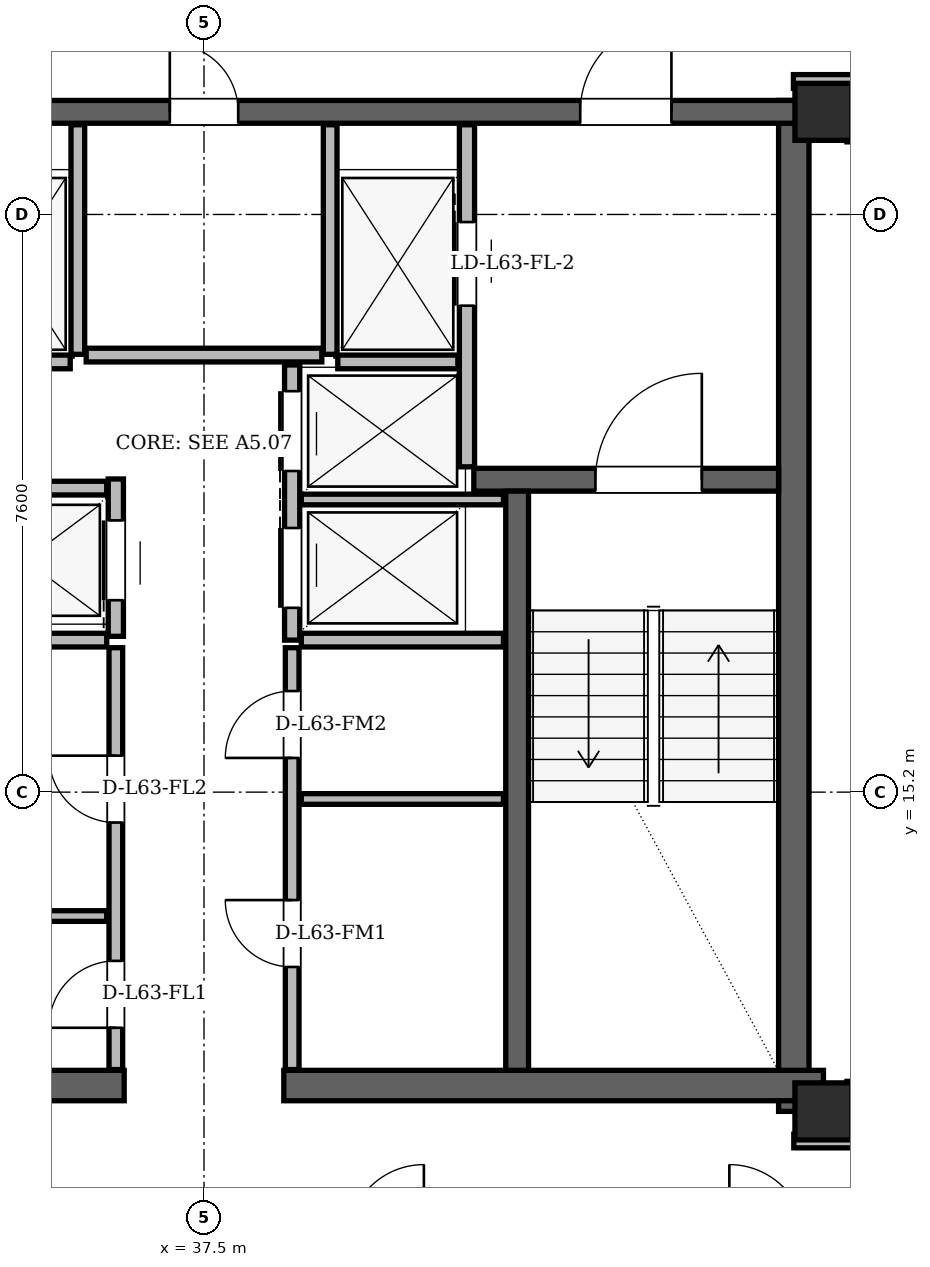
"""IFC4 building model, lengths in metres.
Left out: names, types, materials, properties, quantities, classifications, styles, units other than length and angle.
Written with IfcOpenShell. Run it as: python <this file> out.ifc"""

import sys

from ifc_helpers import new_model, si_unit, direction, frame, frame_2d, origin, origin_2d, place, context, subcontext, project, spatial, rectangle, hollow_rectangle, extrude, element, fill, save


model = new_model("IFC4")
c1 = context("Model", 3, precision=1e-05, world=origin(), true_north=direction((0.0, 1.0)))
c2 = subcontext(c1, "Body", "Model", "MODEL_VIEW")
j1 = project(units=[si_unit("LENGTHUNIT", "METRE"), si_unit("PLANEANGLEUNIT", "RADIAN")], contexts=[c1])
p1 = place(None, origin())
s1 = spatial("IfcSite", under=j1, at=p1, CompositionType="ELEMENT")
p2 = place(p1, origin())
s2 = spatial("IfcBuilding", under=s1, at=p2, CompositionType="ELEMENT")
p3 = place(p2, frame((0.0, 0.0, 237.9)))
s3 = spatial("IfcBuildingStorey", under=s2, at=p3, CompositionType="ELEMENT", Elevation=237.9)
for number, where, z_axis, x_axis in (
    (1, (45.65, 11.0, 0.0), (0.0, 0.0, 1.0), (1.0, 0.0, 0.0)),
    (2, (45.65, 24.15, 0.0), (0.0, 0.0, 1.0), (1.0, 0.0, 0.0)),
):
    element("IfcColumn", number, at=place(p3, frame(where, z_axis=z_axis, x_axis=x_axis)), inside=s3, PredefinedType="COLUMN", context=c2, shape_type="SweptSolid", body=[
        extrude(hollow_rectangle(XDim=0.75, YDim=0.75, WallThickness=0.06, at=origin_2d()), origin(), (0.0, 0.0, 1.0), 3.6),
    ])
p4 = place(p3, frame((45.26, 11.0, 0.0), z_axis=(0.0, 0.0, 1.0), x_axis=(0.0, 1.0, 0.0)))
e3 = element("IfcWall", 3, at=p4, inside=s3, PredefinedType="SHEAR", context=c2, shape_type="SweptSolid", body=[
    extrude(rectangle(XDim=13.3, YDim=0.4, at=frame_2d((6.65, 0.0))), origin(), (0.0, 0.0, 1.0), 3.38),
])
for number, where, z_axis, x_axis in (
    (4, (29.35, 11.34, 0.0), (0.0, 0.0, 1.0), (1.0, 0.0, 0.0)),
    (5, (38.55, 11.34, 0.0), (0.0, 0.0, 1.0), (1.0, 0.0, 0.0)),
):
    element("IfcWall", number, at=place(p3, frame(where, z_axis=z_axis, x_axis=x_axis)), inside=s3, PredefinedType="SHEAR", context=c2, shape_type="SweptSolid", body=[
        extrude(rectangle(XDim=7.1, YDim=0.4, at=frame_2d((3.55, 0.0))), origin(), (0.0, 0.0, 1.0), 3.38),
    ])
p5 = place(p3, frame((29.65, 24.15, 0.0), z_axis=(0.0, 0.0, 1.0), x_axis=(1.0, 0.0, 0.0)))
e6 = element("IfcWall", 6, at=p5, inside=s3, PredefinedType="SHEAR", context=c2, shape_type="SweptSolid", body=[
    extrude(rectangle(XDim=15.7, YDim=0.3, at=frame_2d((7.85, 0.0))), origin(), (0.0, 0.0, 1.0), 3.38),
])
p6 = place(p5, frame((1.7, 0.0, 0.0)))
e7 = element("IfcOpeningElement", 7, at=p6, cuts=e6, PredefinedType="OPENING", context=c2, shape_type="SweptSolid", body=[
    extrude(rectangle(XDim=1.2, YDim=2.2, at=frame_2d((0.6, 1.1))), frame((0.0, 0.15, 0.0), z_axis=(0.0, -1.0, 0.0), x_axis=(1.0, 0.0, 0.0)), (0.0, 0.0, 1.0), 0.3),
])
p7 = place(p5, frame((12.8, 0.0, 0.0)))
e8 = element("IfcOpeningElement", 8, at=p7, cuts=e6, PredefinedType="OPENING", context=c2, shape_type="SweptSolid", body=[
    extrude(rectangle(XDim=1.2, YDim=2.2, at=frame_2d((0.6, 1.1))), frame((0.0, 0.15, 0.0), z_axis=(0.0, -1.0, 0.0), x_axis=(1.0, 0.0, 0.0)), (0.0, 0.0, 1.0), 0.3),
])
p8 = place(p5, frame((7.4, 0.0, 0.0)))
e9 = element("IfcOpeningElement", 9, at=p8, cuts=e6, PredefinedType="OPENING", context=c2, shape_type="SweptSolid", body=[
    extrude(rectangle(XDim=0.9, YDim=2.05, at=frame_2d((0.45, 1.025))), frame((0.0, 0.15, 0.0), z_axis=(0.0, -1.0, 0.0), x_axis=(1.0, 0.0, 0.0)), (0.0, 0.0, 1.0), 0.3),
])
p9 = place(p3, frame((41.05, 19.31, 0.0), z_axis=(0.0, 0.0, 1.0), x_axis=(1.0, 0.0, 0.0)))
e10 = element("IfcWall", 10, at=p9, inside=s3, PredefinedType="SHEAR", context=c2, shape_type="SweptSolid", body=[
    extrude(rectangle(XDim=4.01, YDim=0.3, at=frame_2d((2.005, 0.0))), origin(), (0.0, 0.0, 1.0), 3.38),
])
p10 = place(p9, frame((1.6, 0.0, 0.0)))
e11 = element("IfcOpeningElement", 11, at=p10, cuts=e10, PredefinedType="OPENING", context=c2, shape_type="SweptSolid", body=[
    extrude(rectangle(XDim=1.4, YDim=2.2, at=frame_2d((0.7, 1.1))), frame((0.0, 0.15, 0.0), z_axis=(0.0, -1.0, 0.0), x_axis=(1.0, 0.0, 0.0)), (0.0, 0.0, 1.0), 0.3),
])
p11 = place(p3, frame((41.62, 11.54, 0.0), z_axis=(0.0, 0.0, 1.0), x_axis=(0.0, 1.0, 0.0)))
e12 = element("IfcWall", 12, at=p11, inside=s3, PredefinedType="SHEAR", context=c2, shape_type="SweptSolid", body=[
    extrude(rectangle(XDim=7.62, YDim=0.3, at=frame_2d((3.81, 0.0))), origin(), (0.0, 0.0, 1.0), 3.38),
])
p12 = place(p3, frame((58.899, 11.151, 0.0), z_axis=(0.0, 0.0, 1.0), x_axis=(-0.500002325133, 0.866024061364, 0.0)))
e13 = element("IfcWall", 13, at=p12, inside=s3, PredefinedType="SOLIDWALL", context=c2, shape_type="SweptSolid", body=[
    extrude(rectangle(XDim=36.9, YDim=0.29, at=frame_2d((18.45, 0.0))), origin(), (0.0, 0.0, 1.0), 2.677),
])
p13 = place(p12, frame((3.429, 0.0, 0.0)))
e14 = element("IfcOpeningElement", 14, at=p13, cuts=e13, PredefinedType="OPENING", context=c2, shape_type="SweptSolid", body=[
    extrude(rectangle(XDim=1.5, YDim=2.2, at=frame_2d((0.75, 1.1))), frame((0.0, 0.145, 0.0), z_axis=(0.0, -1.0, 0.0), x_axis=(1.0, 0.0, 0.0)), (0.0, 0.0, 1.0), 0.29),
])
p14 = place(p12, frame((27.156, 0.0, 0.0)))
e15 = element("IfcOpeningElement", 15, at=p14, cuts=e13, PredefinedType="OPENING", context=c2, shape_type="SweptSolid", body=[
    extrude(rectangle(XDim=1.5, YDim=2.2, at=frame_2d((0.75, 1.1))), frame((0.0, 0.145, 0.0), z_axis=(0.0, -1.0, 0.0), x_axis=(1.0, 0.0, 0.0)), (0.0, 0.0, 1.0), 0.29),
])
p15 = place(p12, frame((6.97, 0.0, 0.85)))
e16 = element("IfcOpeningElement", 16, at=p15, cuts=e13, PredefinedType="OPENING", context=c2, shape_type="SweptSolid", body=[
    extrude(rectangle(XDim=1.6, YDim=1.7, at=frame_2d((0.8, 0.85))), frame((0.0, 0.145, 0.0), z_axis=(0.0, -1.0, 0.0), x_axis=(1.0, 0.0, 0.0)), (0.0, 0.0, 1.0), 0.29),
])
p16 = place(p12, frame((1.106, 0.0, 0.85)))
e17 = element("IfcOpeningElement", 17, at=p16, cuts=e13, PredefinedType="OPENING", context=c2, shape_type="SweptSolid", body=[
    extrude(rectangle(XDim=1.6, YDim=1.7, at=frame_2d((0.8, 0.85))), frame((0.0, 0.145, 0.0), z_axis=(0.0, -1.0, 0.0), x_axis=(1.0, 0.0, 0.0)), (0.0, 0.0, 1.0), 0.29),
])
p17 = place(p12, frame((34.697, 0.0, 0.85)))
e18 = element("IfcOpeningElement", 18, at=p17, cuts=e13, PredefinedType="OPENING", context=c2, shape_type="SweptSolid", body=[
    extrude(rectangle(XDim=1.2, YDim=1.48, at=frame_2d((0.6, 0.74))), frame((0.0, 0.145, 0.0), z_axis=(0.0, -1.0, 0.0), x_axis=(1.0, 0.0, 0.0)), (0.0, 0.0, 1.0), 0.29),
])
p18 = place(p12, frame((16.774, 0.0, 0.85)))
e19 = element("IfcOpeningElement", 19, at=p18, cuts=e13, PredefinedType="OPENING", context=c2, shape_type="SweptSolid", body=[
    extrude(rectangle(XDim=2.2, YDim=1.717, at=frame_2d((1.1, 0.858))), frame((0.0, 0.145, 0.0), z_axis=(0.0, -1.0, 0.0), x_axis=(1.0, 0.0, 0.0)), (0.0, 0.0, 1.0), 0.29),
])
p19 = place(p12, frame((22.799, 0.0, 0.85)))
e20 = element("IfcOpeningElement", 20, at=p19, cuts=e13, PredefinedType="OPENING", context=c2, shape_type="SweptSolid", body=[
    extrude(rectangle(XDim=1.6, YDim=1.7, at=frame_2d((0.8, 0.85))), frame((0.0, 0.145, 0.0), z_axis=(0.0, -1.0, 0.0), x_axis=(1.0, 0.0, 0.0)), (0.0, 0.0, 1.0), 0.29),
])
p20 = place(p12, frame((29.059, 0.0, 0.85)))
e21 = element("IfcOpeningElement", 21, at=p20, cuts=e13, PredefinedType="OPENING", context=c2, shape_type="SweptSolid", body=[
    extrude(rectangle(XDim=1.2, YDim=1.48, at=frame_2d((0.6, 0.74))), frame((0.0, 0.145, 0.0), z_axis=(0.0, -1.0, 0.0), x_axis=(1.0, 0.0, 0.0)), (0.0, 0.0, 1.0), 0.29),
])
p21 = place(p12, frame((31.635, 0.0, 0.85)))
e22 = element("IfcOpeningElement", 22, at=p21, cuts=e13, PredefinedType="OPENING", context=c2, shape_type="SweptSolid", body=[
    extrude(rectangle(XDim=1.2, YDim=1.48, at=frame_2d((0.6, 0.74))), frame((0.0, 0.145, 0.0), z_axis=(0.0, -1.0, 0.0), x_axis=(1.0, 0.0, 0.0)), (0.0, 0.0, 1.0), 0.29),
])
p22 = place(p12, frame((12.419, 0.0, 0.85)))
e23 = element("IfcOpeningElement", 23, at=p22, cuts=e13, PredefinedType="OPENING", context=c2, shape_type="SweptSolid", body=[
    extrude(rectangle(XDim=1.2, YDim=1.48, at=frame_2d((0.6, 0.74))), frame((0.0, 0.145, 0.0), z_axis=(0.0, -1.0, 0.0), x_axis=(1.0, 0.0, 0.0)), (0.0, 0.0, 1.0), 0.29),
])
p23 = place(p3, frame((35.84, 20.96, 0.0), z_axis=(0.0, 0.0, 1.0), x_axis=(0.0, 1.0, 0.0)))
e24 = element("IfcWall", 24, at=p23, inside=s3, PredefinedType="PARTITIONING", context=c2, shape_type="SweptSolid", body=[
    extrude(rectangle(XDim=3.02, YDim=0.18, at=frame_2d((1.51, 0.0))), origin(), (0.0, 0.0, 1.0), 3.38),
])
p24 = place(p3, frame((34.16, 20.86, 0.0), z_axis=(0.0, 0.0, 1.0), x_axis=(1.0, 0.0, 0.0)))
e25 = element("IfcWall", 25, at=p24, inside=s3, PredefinedType="PARTITIONING", context=c2, shape_type="SweptSolid", body=[
    extrude(rectangle(XDim=1.58, YDim=0.18, at=frame_2d((0.79, 0.0))), origin(), (0.0, 0.0, 1.0), 3.38),
])
p25 = place(p3, frame((40.96, 19.48, 0.0), z_axis=(0.0, 0.0, 1.0), x_axis=(0.0, 1.0, 0.0)))
e26 = element("IfcWall", 26, at=p25, inside=s3, PredefinedType="PARTITIONING", context=c2, shape_type="SweptSolid", body=[
    extrude(rectangle(XDim=4.5, YDim=0.2, at=frame_2d((2.25, 0.0))), origin(), (0.0, 0.0, 1.0), 3.38),
])
p26 = place(p25, frame((2.12, 0.0, 0.0)))
e27 = element("IfcOpeningElement", 27, at=p26, cuts=e26, PredefinedType="OPENING", context=c2, shape_type="SweptSolid", body=[
    extrude(rectangle(XDim=1.1, YDim=2.2, at=frame_2d((0.55, 1.1))), frame((0.0, 0.1, 0.0), z_axis=(0.0, -1.0, 0.0), x_axis=(1.0, 0.0, 0.0)), (0.0, 0.0, 1.0), 0.2),
])
p27 = place(p3, frame((39.16, 20.96, 0.0), z_axis=(0.0, 0.0, 1.0), x_axis=(0.0, 1.0, 0.0)))
e28 = element("IfcWall", 28, at=p27, inside=s3, PredefinedType="PARTITIONING", context=c2, shape_type="SweptSolid", body=[
    extrude(rectangle(XDim=3.02, YDim=0.18, at=frame_2d((1.51, 0.0))), origin(), (0.0, 0.0, 1.0), 3.38),
])
p28 = place(p3, frame((39.26, 20.86, 0.0), z_axis=(0.0, 0.0, 1.0), x_axis=(1.0, 0.0, 0.0)))
e29 = element("IfcWall", 29, at=p28, inside=s3, PredefinedType="PARTITIONING", context=c2, shape_type="SweptSolid", body=[
    extrude(rectangle(XDim=1.58, YDim=0.18, at=frame_2d((0.79, 0.0))), origin(), (0.0, 0.0, 1.0), 3.38),
])
p29 = place(p3, frame((36.34, 17.25, 0.0), z_axis=(0.0, 0.0, 1.0), x_axis=(0.0, 1.0, 0.0)))
e30 = element("IfcWall", 30, at=p29, inside=s3, PredefinedType="PARTITIONING", context=c2, shape_type="SweptSolid", body=[
    extrude(rectangle(XDim=2.07, YDim=0.2, at=frame_2d((1.035, 0.0))), origin(), (0.0, 0.0, 1.0), 3.38),
])
p30 = place(p29, frame((0.475, 0.0, 0.0)))
e31 = element("IfcOpeningElement", 31, at=p30, cuts=e30, PredefinedType="OPENING", context=c2, shape_type="SweptSolid", body=[
    extrude(rectangle(XDim=1.05, YDim=2.15, at=frame_2d((0.525, 1.075))), frame((0.0, 0.1, 0.0), z_axis=(0.0, -1.0, 0.0), x_axis=(1.0, 0.0, 0.0)), (0.0, 0.0, 1.0), 0.2),
])
p31 = place(p3, frame((33.95, 19.2, 0.0), z_axis=(0.0, 0.0, 1.0), x_axis=(1.0, 0.0, 0.0)))
e32 = element("IfcWall", 32, at=p31, inside=s3, PredefinedType="PARTITIONING", context=c2, shape_type="SweptSolid", body=[
    extrude(rectangle(XDim=2.27, YDim=0.18, at=frame_2d((1.135, 0.0))), origin(), (0.0, 0.0, 1.0), 3.38),
])
p32 = place(p3, frame((33.56, 17.2, 0.0), z_axis=(0.0, 0.0, 1.0), x_axis=(1.0, 0.0, 0.0)))
e33 = element("IfcWall", 33, at=p32, inside=s3, PredefinedType="PARTITIONING", context=c2, shape_type="SweptSolid", body=[
    extrude(rectangle(XDim=2.66, YDim=0.18, at=frame_2d((1.33, 0.0))), origin(), (0.0, 0.0, 1.0), 3.38),
])
p33 = place(p3, frame((36.34, 11.55, 0.0), z_axis=(0.0, 0.0, 1.0), x_axis=(0.0, 1.0, 0.0)))
e34 = element("IfcWall", 34, at=p33, inside=s3, PredefinedType="PARTITIONING", context=c2, shape_type="SweptSolid", body=[
    extrude(rectangle(XDim=5.55, YDim=0.18, at=frame_2d((2.775, 0.0))), origin(), (0.0, 0.0, 1.0), 3.38),
])
p34 = place(p33, frame((0.55, 0.0, 0.0)))
e35 = element("IfcOpeningElement", 35, at=p34, cuts=e34, PredefinedType="OPENING", context=c2, shape_type="SweptSolid", body=[
    extrude(rectangle(XDim=0.88, YDim=2.08, at=frame_2d((0.44, 1.04))), frame((0.0, 0.09, 0.0), z_axis=(0.0, -1.0, 0.0), x_axis=(1.0, 0.0, 0.0)), (0.0, 0.0, 1.0), 0.18),
])
p35 = place(p33, frame((3.25, 0.0, 0.0)))
e36 = element("IfcOpeningElement", 36, at=p35, cuts=e34, PredefinedType="OPENING", context=c2, shape_type="SweptSolid", body=[
    extrude(rectangle(XDim=0.88, YDim=2.08, at=frame_2d((0.44, 1.04))), frame((0.0, 0.09, 0.0), z_axis=(0.0, -1.0, 0.0), x_axis=(1.0, 0.0, 0.0)), (0.0, 0.0, 1.0), 0.18),
])
p36 = place(p3, frame((33.56, 13.57, 0.0), z_axis=(0.0, 0.0, 1.0), x_axis=(1.0, 0.0, 0.0)))
e37 = element("IfcWall", 37, at=p36, inside=s3, PredefinedType="PARTITIONING", context=c2, shape_type="SweptSolid", body=[
    extrude(rectangle(XDim=2.66, YDim=0.14, at=frame_2d((1.33, 0.0))), origin(), (0.0, 0.0, 1.0), 3.38),
])
p37 = place(p3, frame((38.66, 17.2, 0.0), z_axis=(0.0, 0.0, 1.0), x_axis=(0.0, 1.0, 0.0)))
e38 = element("IfcWall", 38, at=p37, inside=s3, PredefinedType="PARTITIONING", context=c2, shape_type="SweptSolid", body=[
    extrude(rectangle(XDim=3.62, YDim=0.2, at=frame_2d((1.81, 0.0))), origin(), (0.0, 0.0, 1.0), 3.38),
])
p38 = place(p37, frame((0.425, 0.0, 0.0)))
e39 = element("IfcOpeningElement", 39, at=p38, cuts=e38, PredefinedType="OPENING", context=c2, shape_type="SweptSolid", body=[
    extrude(rectangle(XDim=1.05, YDim=2.15, at=frame_2d((0.525, 1.075))), frame((0.0, 0.1, 0.0), z_axis=(0.0, -1.0, 0.0), x_axis=(1.0, 0.0, 0.0)), (0.0, 0.0, 1.0), 0.2),
])
p39 = place(p37, frame((2.225, 0.0, 0.0)))
e40 = element("IfcOpeningElement", 40, at=p39, cuts=e38, PredefinedType="OPENING", context=c2, shape_type="SweptSolid", body=[
    extrude(rectangle(XDim=1.05, YDim=2.15, at=frame_2d((0.525, 1.075))), frame((0.0, 0.1, 0.0), z_axis=(0.0, -1.0, 0.0), x_axis=(1.0, 0.0, 0.0)), (0.0, 0.0, 1.0), 0.2),
])
p40 = place(p3, frame((38.78, 17.2, 0.0), z_axis=(0.0, 0.0, 1.0), x_axis=(1.0, 0.0, 0.0)))
e41 = element("IfcWall", 41, at=p40, inside=s3, PredefinedType="PARTITIONING", context=c2, shape_type="SweptSolid", body=[
    extrude(rectangle(XDim=2.66, YDim=0.18, at=frame_2d((1.33, 0.0))), origin(), (0.0, 0.0, 1.0), 3.38),
])
p41 = place(p3, frame((38.78, 19.05, 0.0), z_axis=(0.0, 0.0, 1.0), x_axis=(1.0, 0.0, 0.0)))
e42 = element("IfcWall", 42, at=p41, inside=s3, PredefinedType="PARTITIONING", context=c2, shape_type="SweptSolid", body=[
    extrude(rectangle(XDim=2.66, YDim=0.14, at=frame_2d((1.33, 0.0))), origin(), (0.0, 0.0, 1.0), 3.38),
])
p42 = place(p3, frame((38.66, 11.55, 0.0), z_axis=(0.0, 0.0, 1.0), x_axis=(0.0, 1.0, 0.0)))
e43 = element("IfcWall", 43, at=p42, inside=s3, PredefinedType="PARTITIONING", context=c2, shape_type="SweptSolid", body=[
    extrude(rectangle(XDim=5.55, YDim=0.18, at=frame_2d((2.775, 0.0))), origin(), (0.0, 0.0, 1.0), 3.38),
])
p43 = place(p42, frame((1.35, 0.0, 0.0)))
e44 = element("IfcOpeningElement", 44, at=p43, cuts=e43, PredefinedType="OPENING", context=c2, shape_type="SweptSolid", body=[
    extrude(rectangle(XDim=0.88, YDim=2.08, at=frame_2d((0.44, 1.04))), frame((0.0, 0.09, 0.0), z_axis=(0.0, -1.0, 0.0), x_axis=(1.0, 0.0, 0.0)), (0.0, 0.0, 1.0), 0.18),
])
p44 = place(p42, frame((4.1, 0.0, 0.0)))
e45 = element("IfcOpeningElement", 45, at=p44, cuts=e43, PredefinedType="OPENING", context=c2, shape_type="SweptSolid", body=[
    extrude(rectangle(XDim=0.88, YDim=2.08, at=frame_2d((0.44, 1.04))), frame((0.0, 0.09, 0.0), z_axis=(0.0, -1.0, 0.0), x_axis=(1.0, 0.0, 0.0)), (0.0, 0.0, 1.0), 0.18),
])
p45 = place(p3, frame((38.78, 15.11, 0.0), z_axis=(0.0, 0.0, 1.0), x_axis=(1.0, 0.0, 0.0)))
e46 = element("IfcWall", 46, at=p45, inside=s3, PredefinedType="PARTITIONING", context=c2, shape_type="SweptSolid", body=[
    extrude(rectangle(XDim=2.66, YDim=0.14, at=frame_2d((1.33, 0.0))), origin(), (0.0, 0.0, 1.0), 3.38),
])
p46 = place(p3, frame((35.95, 20.95, 0.0), z_axis=(0.0, 0.0, 1.0), x_axis=(1.0, 0.0, 0.0)))
e47 = element("IfcWall", 47, at=p46, inside=s3, PredefinedType="PARTITIONING", context=c2, shape_type="SweptSolid", body=[
    extrude(rectangle(XDim=3.1, YDim=0.18, at=frame_2d((1.55, 0.0))), origin(), (0.0, 0.0, 1.0), 3.38),
])
p47 = place(p3, frame((45.26, 10.61, 0.0), z_axis=(0.0, 0.0, 1.0), x_axis=(1.0, 0.0, 0.0)))
e48 = element("IfcWall", 48, at=p47, inside=s3, PredefinedType="PARTITIONING", context=c2, shape_type="SweptSolid", body=[
    extrude(rectangle(XDim=0.78, YDim=0.18, at=frame_2d((0.39, 0.0))), origin(), (0.0, 0.0, 1.0), 3.38),
])
p48 = place(p3, frame((45.255, 24.55, 0.0), z_axis=(0.0, 0.0, 1.0), x_axis=(1.0, 0.0, 0.0)))
e49 = element("IfcWall", 49, at=p48, inside=s3, PredefinedType="PARTITIONING", context=c2, shape_type="SweptSolid", body=[
    extrude(rectangle(XDim=0.79, YDim=0.18, at=frame_2d((0.395, 0.0))), origin(), (0.0, 0.0, 1.0), 2.913),
])
p49 = place(p3, frame((46.05, 10.95, 0.0), z_axis=(0.0, 0.0, 1.0), x_axis=(0.0, 1.0, 0.0)))
e50 = element("IfcWall", 50, at=p49, inside=s3, PredefinedType="PARTITIONING", context=c2, shape_type="SweptSolid", body=[
    extrude(rectangle(XDim=0.445, YDim=0.18, at=frame_2d((0.223, 0.0))), origin(), (0.0, 0.0, 1.0), 2.913),
])
p50 = place(p3, frame((46.05, 23.755, 0.0), z_axis=(0.0, 0.0, 1.0), x_axis=(0.0, 1.0, 0.0)))
e51 = element("IfcWall", 51, at=p50, inside=s3, PredefinedType="PARTITIONING", context=c2, shape_type="SweptSolid", body=[
    extrude(rectangle(XDim=0.565, YDim=0.18, at=frame_2d((0.283, 0.0))), origin(), (0.0, 0.0, 1.0), 3.38),
])
p51 = place(p34, origin())
e52 = element("IfcDoor", 52, at=p51, inside=s3, OperationType="SINGLE_SWING_LEFT", PredefinedType="DOOR", context=c2, shape_type="SweptSolid", body=[
    extrude(rectangle(XDim=0.88, YDim=2.08, at=frame_2d((0.44, 1.04))), frame((0.0, 0.025, 0.0), z_axis=(0.0, -1.0, 0.0), x_axis=(1.0, 0.0, 0.0)), (0.0, 0.0, 1.0), 0.05),
])
fill(e35, e52)
p52 = place(p35, origin())
e53 = element("IfcDoor", 53, at=p52, inside=s3, OperationType="SINGLE_SWING_RIGHT", PredefinedType="DOOR", context=c2, shape_type="SweptSolid", body=[
    extrude(rectangle(XDim=0.88, YDim=2.08, at=frame_2d((0.44, 1.04))), frame((0.0, 0.025, 0.0), z_axis=(0.0, -1.0, 0.0), x_axis=(1.0, 0.0, 0.0)), (0.0, 0.0, 1.0), 0.05),
])
fill(e36, e53)
p53 = place(p43, origin())
e54 = element("IfcDoor", 54, at=p53, inside=s3, OperationType="SINGLE_SWING_RIGHT", PredefinedType="DOOR", context=c2, shape_type="SweptSolid", body=[
    extrude(rectangle(XDim=0.88, YDim=2.08, at=frame_2d((0.44, 1.04))), frame((0.0, 0.025, 0.0), z_axis=(0.0, -1.0, 0.0), x_axis=(1.0, 0.0, 0.0)), (0.0, 0.0, 1.0), 0.05),
])
fill(e44, e54)
p54 = place(p44, origin())
e55 = element("IfcDoor", 55, at=p54, inside=s3, OperationType="SINGLE_SWING_LEFT", PredefinedType="DOOR", context=c2, shape_type="SweptSolid", body=[
    extrude(rectangle(XDim=0.88, YDim=2.08, at=frame_2d((0.44, 1.04))), frame((0.0, 0.025, 0.0), z_axis=(0.0, -1.0, 0.0), x_axis=(1.0, 0.0, 0.0)), (0.0, 0.0, 1.0), 0.05),
])
fill(e45, e55)
p55 = place(p26, origin())
e56 = element("IfcDoor", 56, at=p55, inside=s3, OperationType="SLIDING_TO_RIGHT", PredefinedType="DOOR", context=c2, shape_type="SweptSolid", body=[
    extrude(rectangle(XDim=1.1, YDim=2.2, at=frame_2d((0.55, 1.1))), frame((0.0, 0.025, 0.0), z_axis=(0.0, -1.0, 0.0), x_axis=(1.0, 0.0, 0.0)), (0.0, 0.0, 1.0), 0.05),
])
fill(e27, e56)
p56 = place(p30, origin())
e57 = element("IfcDoor", 57, at=p56, inside=s3, OperationType="SLIDING_TO_LEFT", PredefinedType="DOOR", context=c2, shape_type="SweptSolid", body=[
    extrude(rectangle(XDim=1.05, YDim=2.15, at=frame_2d((0.525, 1.075))), frame((0.0, 0.025, 0.0), z_axis=(0.0, -1.0, 0.0), x_axis=(1.0, 0.0, 0.0)), (0.0, 0.0, 1.0), 0.05),
])
fill(e31, e57)
p57 = place(p38, origin())
e58 = element("IfcDoor", 58, at=p57, inside=s3, OperationType="SLIDING_TO_RIGHT", PredefinedType="DOOR", context=c2, shape_type="SweptSolid", body=[
    extrude(rectangle(XDim=1.05, YDim=2.15, at=frame_2d((0.525, 1.075))), frame((0.0, 0.025, 0.0), z_axis=(0.0, -1.0, 0.0), x_axis=(1.0, 0.0, 0.0)), (0.0, 0.0, 1.0), 0.05),
])
fill(e39, e58)
p58 = place(p39, origin())
e59 = element("IfcDoor", 59, at=p58, inside=s3, OperationType="SLIDING_TO_LEFT", PredefinedType="DOOR", context=c2, shape_type="SweptSolid", body=[
    extrude(rectangle(XDim=1.05, YDim=2.15, at=frame_2d((0.525, 1.075))), frame((0.0, 0.025, 0.0), z_axis=(0.0, -1.0, 0.0), x_axis=(1.0, 0.0, 0.0)), (0.0, 0.0, 1.0), 0.05),
])
fill(e40, e59)
p59 = place(p10, origin())
e60 = element("IfcDoor", 60, at=p59, inside=s3, OperationType="SINGLE_SWING_RIGHT", PredefinedType="DOOR", context=c2, shape_type="SweptSolid", body=[
    extrude(rectangle(XDim=1.4, YDim=2.2, at=frame_2d((0.7, 1.1))), frame((0.0, 0.025, 0.0), z_axis=(0.0, -1.0, 0.0), x_axis=(1.0, 0.0, 0.0)), (0.0, 0.0, 1.0), 0.05),
])
fill(e11, e60)
p60 = place(p7, origin())
e61 = element("IfcDoor", 61, at=p60, inside=s3, OperationType="SINGLE_SWING_RIGHT", PredefinedType="DOOR", context=c2, shape_type="SweptSolid", body=[
    extrude(rectangle(XDim=1.2, YDim=2.2, at=frame_2d((0.6, 1.1))), frame((0.0, 0.025, 0.0), z_axis=(0.0, -1.0, 0.0), x_axis=(1.0, 0.0, 0.0)), (0.0, 0.0, 1.0), 0.05),
])
fill(e8, e61)
p61 = place(p8, origin())
e62 = element("IfcDoor", 62, at=p61, inside=s3, OperationType="SINGLE_SWING_LEFT", PredefinedType="DOOR", context=c2, shape_type="SweptSolid", body=[
    extrude(rectangle(XDim=0.9, YDim=2.05, at=frame_2d((0.45, 1.025))), frame((0.0, 0.025, 0.0), z_axis=(0.0, -1.0, 0.0), x_axis=(1.0, 0.0, 0.0)), (0.0, 0.0, 1.0), 0.05),
])
fill(e9, e62)
save(model, sys.argv[1])
